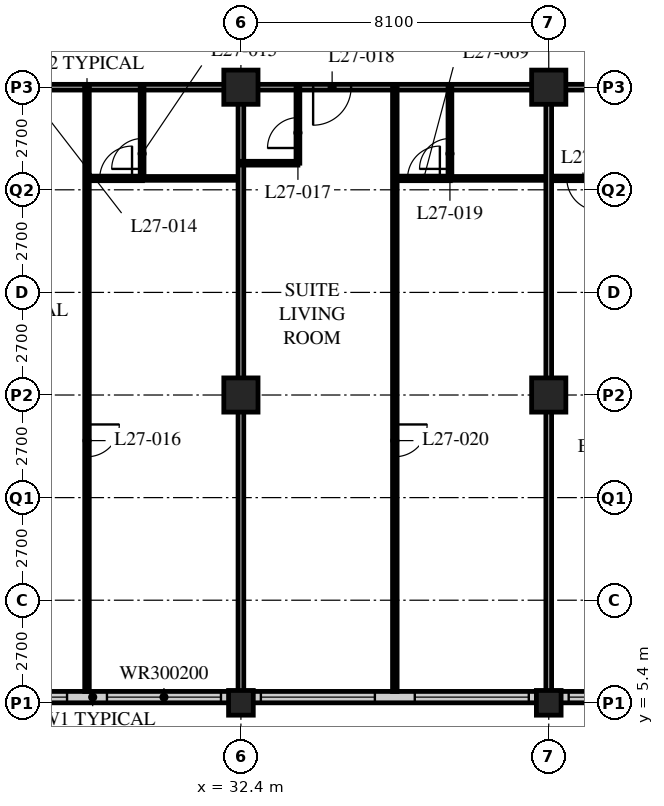
"""IFC4 building model, lengths in metres.
Left out: names, types, materials, properties, quantities, classifications, styles, units other than length and angle.
Written with IfcOpenShell. Run it as: python <this file> out.ifc"""

import sys

from ifc_helpers import new_model, si_unit, direction, frame, frame_2d, origin, origin_2d, place, context, subcontext, project, spatial, rectangle, hollow_rectangle, extrude, element, fill, save


model = new_model("IFC4")
c1 = context("Model", 3, precision=1e-05, world=origin(), true_north=direction((0.0, 1.0)))
c2 = subcontext(c1, "Body", "Model", "MODEL_VIEW")
j1 = project(units=[si_unit("LENGTHUNIT", "METRE"), si_unit("PLANEANGLEUNIT", "RADIAN")], contexts=[c1])
p1 = place(None, origin())
s1 = spatial("IfcSite", under=j1, at=p1, CompositionType="ELEMENT")
p2 = place(p1, origin())
s2 = spatial("IfcBuilding", under=s1, at=p2, CompositionType="ELEMENT")
p3 = place(p2, frame((0.0, 0.0, 110.2)))
s3 = spatial("IfcBuildingStorey", under=s2, at=p3, CompositionType="ELEMENT", Elevation=110.2)
p4 = place(p3, frame((32.4, 5.4, 0.0), z_axis=(0.0, 0.0, 1.0), x_axis=(1.0, 0.0, 0.0)))
e1 = element("IfcColumn", 1, at=p4, inside=s3, PredefinedType="COLUMN", context=c2, shape_type="SweptSolid", body=[
    extrude(hollow_rectangle(XDim=0.65, YDim=0.65, WallThickness=0.055, at=origin_2d()), origin(), (0.0, 0.0, 1.0), 3.4),
])
for number, where, z_axis, x_axis in (
    (2, (32.4, 13.5, 0.0), (0.0, 0.0, 1.0), (1.0, 0.0, 0.0)),
    (3, (32.4, 21.6, 0.0), (0.0, 0.0, 1.0), (1.0, 0.0, 0.0)),
):
    element("IfcColumn", number, at=place(p3, frame(where, z_axis=z_axis, x_axis=x_axis)), inside=s3, PredefinedType="COLUMN", context=c2, shape_type="SweptSolid", body=[
        extrude(hollow_rectangle(XDim=0.9, YDim=0.9, WallThickness=0.09, at=origin_2d()), origin(), (0.0, 0.0, 1.0), 3.4),
    ])
p5 = place(p3, frame((40.5, 5.4, 0.0), z_axis=(0.0, 0.0, 1.0), x_axis=(1.0, 0.0, 0.0)))
e4 = element("IfcColumn", 4, at=p5, inside=s3, PredefinedType="COLUMN", context=c2, shape_type="SweptSolid", body=[
    extrude(hollow_rectangle(XDim=0.65, YDim=0.65, WallThickness=0.055, at=origin_2d()), origin(), (0.0, 0.0, 1.0), 3.4),
])
for number, where, z_axis, x_axis in (
    (5, (40.5, 13.5, 0.0), (0.0, 0.0, 1.0), (1.0, 0.0, 0.0)),
    (6, (40.5, 21.6, 0.0), (0.0, 0.0, 1.0), (1.0, 0.0, 0.0)),
):
    element("IfcColumn", number, at=place(p3, frame(where, z_axis=z_axis, x_axis=x_axis)), inside=s3, PredefinedType="COLUMN", context=c2, shape_type="SweptSolid", body=[
        extrude(hollow_rectangle(XDim=0.9, YDim=0.9, WallThickness=0.09, at=origin_2d()), origin(), (0.0, 0.0, 1.0), 3.4),
    ])
p6 = place(p3, frame((8.4, 5.55, 0.0), z_axis=(0.0, 0.0, 1.0), x_axis=(1.0, 0.0, 0.0)))
e7 = element("IfcWall", 7, at=p6, inside=s3, PredefinedType="SOLIDWALL", context=c2, shape_type="SweptSolid", body=[
    extrude(rectangle(XDim=40.2, YDim=0.3, at=frame_2d((20.1, 0.0))), origin(), (0.0, 0.0, 1.0), 3.19),
])
p7 = place(p6, frame((0.225, 0.0, 0.9)))
e8 = element("IfcOpeningElement", 8, at=p7, cuts=e7, PredefinedType="OPENING", context=c2, shape_type="SweptSolid", body=[
    extrude(rectangle(XDim=3.0, YDim=2.0, at=frame_2d((1.5, 1.0))), frame((0.0, 0.16, 0.0), z_axis=(0.0, -1.0, 0.0), x_axis=(1.0, 0.0, 0.0)), (0.0, 0.0, 1.0), 0.32),
])
p8 = place(p6, frame((4.275, 0.0, 0.9)))
e9 = element("IfcOpeningElement", 9, at=p8, cuts=e7, PredefinedType="OPENING", context=c2, shape_type="SweptSolid", body=[
    extrude(rectangle(XDim=3.0, YDim=2.0, at=frame_2d((1.5, 1.0))), frame((0.0, 0.16, 0.0), z_axis=(0.0, -1.0, 0.0), x_axis=(1.0, 0.0, 0.0)), (0.0, 0.0, 1.0), 0.32),
])
p9 = place(p6, frame((8.325, 0.0, 0.9)))
e10 = element("IfcOpeningElement", 10, at=p9, cuts=e7, PredefinedType="OPENING", context=c2, shape_type="SweptSolid", body=[
    extrude(rectangle(XDim=3.0, YDim=2.0, at=frame_2d((1.5, 1.0))), frame((0.0, 0.16, 0.0), z_axis=(0.0, -1.0, 0.0), x_axis=(1.0, 0.0, 0.0)), (0.0, 0.0, 1.0), 0.32),
])
p10 = place(p6, frame((12.375, 0.0, 0.9)))
e11 = element("IfcOpeningElement", 11, at=p10, cuts=e7, PredefinedType="OPENING", context=c2, shape_type="SweptSolid", body=[
    extrude(rectangle(XDim=3.0, YDim=2.0, at=frame_2d((1.5, 1.0))), frame((0.0, 0.16, 0.0), z_axis=(0.0, -1.0, 0.0), x_axis=(1.0, 0.0, 0.0)), (0.0, 0.0, 1.0), 0.32),
])
p11 = place(p6, frame((16.425, 0.0, 0.9)))
e12 = element("IfcOpeningElement", 12, at=p11, cuts=e7, PredefinedType="OPENING", context=c2, shape_type="SweptSolid", body=[
    extrude(rectangle(XDim=3.0, YDim=2.0, at=frame_2d((1.5, 1.0))), frame((0.0, 0.16, 0.0), z_axis=(0.0, -1.0, 0.0), x_axis=(1.0, 0.0, 0.0)), (0.0, 0.0, 1.0), 0.32),
])
p12 = place(p6, frame((20.475, 0.0, 0.9)))
e13 = element("IfcOpeningElement", 13, at=p12, cuts=e7, PredefinedType="OPENING", context=c2, shape_type="SweptSolid", body=[
    extrude(rectangle(XDim=3.0, YDim=2.0, at=frame_2d((1.5, 1.0))), frame((0.0, 0.16, 0.0), z_axis=(0.0, -1.0, 0.0), x_axis=(1.0, 0.0, 0.0)), (0.0, 0.0, 1.0), 0.32),
])
p13 = place(p6, frame((24.525, 0.0, 0.9)))
e14 = element("IfcOpeningElement", 14, at=p13, cuts=e7, PredefinedType="OPENING", context=c2, shape_type="SweptSolid", body=[
    extrude(rectangle(XDim=3.0, YDim=2.0, at=frame_2d((1.5, 1.0))), frame((0.0, 0.16, 0.0), z_axis=(0.0, -1.0, 0.0), x_axis=(1.0, 0.0, 0.0)), (0.0, 0.0, 1.0), 0.32),
])
p14 = place(p6, frame((28.575, 0.0, 0.9)))
e15 = element("IfcOpeningElement", 15, at=p14, cuts=e7, PredefinedType="OPENING", context=c2, shape_type="SweptSolid", body=[
    extrude(rectangle(XDim=3.0, YDim=2.0, at=frame_2d((1.5, 1.0))), frame((0.0, 0.16, 0.0), z_axis=(0.0, -1.0, 0.0), x_axis=(1.0, 0.0, 0.0)), (0.0, 0.0, 1.0), 0.32),
])
p15 = place(p6, frame((32.625, 0.0, 0.9)))
e16 = element("IfcOpeningElement", 16, at=p15, cuts=e7, PredefinedType="OPENING", context=c2, shape_type="SweptSolid", body=[
    extrude(rectangle(XDim=3.0, YDim=2.0, at=frame_2d((1.5, 1.0))), frame((0.0, 0.16, 0.0), z_axis=(0.0, -1.0, 0.0), x_axis=(1.0, 0.0, 0.0)), (0.0, 0.0, 1.0), 0.32),
])
p16 = place(p6, frame((36.675, 0.0, 0.9)))
e17 = element("IfcOpeningElement", 17, at=p16, cuts=e7, PredefinedType="OPENING", context=c2, shape_type="SweptSolid", body=[
    extrude(rectangle(XDim=3.0, YDim=2.0, at=frame_2d((1.5, 1.0))), frame((0.0, 0.16, 0.0), z_axis=(0.0, -1.0, 0.0), x_axis=(1.0, 0.0, 0.0)), (0.0, 0.0, 1.0), 0.32),
])
p17 = place(p3, frame((12.15, 21.6, 0.0), z_axis=(0.0, 0.0, 1.0), x_axis=(1.0, 0.0, 0.0)))
e18 = element("IfcWall", 18, at=p17, inside=s3, PredefinedType="PARTITIONING", context=c2, shape_type="SweptSolid", body=[
    extrude(rectangle(XDim=32.4, YDim=0.15, at=frame_2d((16.2, 0.0))), origin(), (0.0, 0.0, 1.0), 2.578),
])
p18 = place(p17, frame((5.95, 0.0, 0.0)))
e19 = element("IfcOpeningElement", 19, at=p18, cuts=e18, PredefinedType="OPENING", context=c2, shape_type="SweptSolid", body=[
    extrude(rectangle(XDim=1.0, YDim=2.1, at=frame_2d((0.5, 1.05))), frame((0.0, 0.085, 0.0), z_axis=(0.0, -1.0, 0.0), x_axis=(1.0, 0.0, 0.0)), (0.0, 0.0, 1.0), 0.17),
])
p19 = place(p17, frame((14.05, 0.0, 0.0)))
e20 = element("IfcOpeningElement", 20, at=p19, cuts=e18, PredefinedType="OPENING", context=c2, shape_type="SweptSolid", body=[
    extrude(rectangle(XDim=1.0, YDim=2.1, at=frame_2d((0.5, 1.05))), frame((0.0, 0.085, 0.0), z_axis=(0.0, -1.0, 0.0), x_axis=(1.0, 0.0, 0.0)), (0.0, 0.0, 1.0), 0.17),
])
p20 = place(p17, frame((22.15, 0.0, 0.0)))
e21 = element("IfcOpeningElement", 21, at=p20, cuts=e18, PredefinedType="OPENING", context=c2, shape_type="SweptSolid", body=[
    extrude(rectangle(XDim=1.0, YDim=2.1, at=frame_2d((0.5, 1.05))), frame((0.0, 0.085, 0.0), z_axis=(0.0, -1.0, 0.0), x_axis=(1.0, 0.0, 0.0)), (0.0, 0.0, 1.0), 0.17),
])
p21 = place(p17, frame((1.525, 0.0, 0.0)))
e22 = element("IfcOpeningElement", 22, at=p21, cuts=e18, PredefinedType="OPENING", context=c2, shape_type="SweptSolid", body=[
    extrude(rectangle(XDim=1.0, YDim=2.1, at=frame_2d((0.5, 1.05))), frame((0.0, 0.085, 0.0), z_axis=(0.0, -1.0, 0.0), x_axis=(1.0, 0.0, 0.0)), (0.0, 0.0, 1.0), 0.17),
])
p22 = place(p17, frame((29.875, 0.0, 0.0)))
e23 = element("IfcOpeningElement", 23, at=p22, cuts=e18, PredefinedType="OPENING", context=c2, shape_type="SweptSolid", body=[
    extrude(rectangle(XDim=1.0, YDim=2.1, at=frame_2d((0.5, 1.05))), frame((0.0, 0.085, 0.0), z_axis=(0.0, -1.0, 0.0), x_axis=(1.0, 0.0, 0.0)), (0.0, 0.0, 1.0), 0.17),
])
p23 = place(p3, frame((29.8, 19.2, 0.0), z_axis=(0.0, 0.0, 1.0), x_axis=(1.0, 0.0, 0.0)))
e24 = element("IfcWall", 24, at=p23, inside=s3, PredefinedType="PARTITIONING", context=c2, shape_type="SweptSolid", body=[
    extrude(rectangle(XDim=2.6, YDim=0.1, at=frame_2d((1.3, 0.0))), origin(), (0.0, 0.0, 1.0), 3.19),
])
p24 = place(p3, frame((29.8, 21.6, 0.0), z_axis=(0.0, 0.0, 1.0), x_axis=(0.0, -1.0, 0.0)))
e25 = element("IfcWall", 25, at=p24, inside=s3, PredefinedType="PARTITIONING", context=c2, shape_type="SweptSolid", body=[
    extrude(rectangle(XDim=2.4, YDim=0.1, at=frame_2d((1.2, 0.0))), origin(), (0.0, 0.0, 1.0), 3.19),
])
p25 = place(p24, frame((1.35, 0.0, 0.0)))
e26 = element("IfcOpeningElement", 26, at=p25, cuts=e25, PredefinedType="OPENING", context=c2, shape_type="SweptSolid", body=[
    extrude(rectangle(XDim=0.8, YDim=2.1, at=frame_2d((0.4, 1.05))), frame((0.0, 0.06, 0.0), z_axis=(0.0, -1.0, 0.0), x_axis=(1.0, 0.0, 0.0)), (0.0, 0.0, 1.0), 0.12),
])
p26 = place(p3, frame((28.35, 21.6, 0.0), z_axis=(0.0, 0.0, 1.0), x_axis=(0.0, -1.0, 0.0)))
e27 = element("IfcWall", 27, at=p26, inside=s3, PredefinedType="PARTITIONING", context=c2, shape_type="SweptSolid", body=[
    extrude(rectangle(XDim=15.9, YDim=0.12, at=frame_2d((7.95, 0.0))), origin(), (0.0, 0.0, 1.0), 3.19),
])
p27 = place(p26, frame((8.875, 0.0, 0.0)))
e28 = element("IfcOpeningElement", 28, at=p27, cuts=e27, PredefinedType="OPENING", context=c2, shape_type="SweptSolid", body=[
    extrude(rectangle(XDim=0.85, YDim=2.1, at=frame_2d((0.425, 1.05))), frame((0.0, 0.07, 0.0), z_axis=(0.0, -1.0, 0.0), x_axis=(1.0, 0.0, 0.0)), (0.0, 0.0, 1.0), 0.14),
])
p28 = place(p3, frame((32.4, 21.6, 0.0), z_axis=(0.0, 0.0, 1.0), x_axis=(0.0, -1.0, 0.0)))
e29 = element("IfcWall", 29, at=p28, inside=s3, PredefinedType="PARTITIONING", context=c2, shape_type="SweptSolid", body=[
    extrude(rectangle(XDim=15.9, YDim=0.15, at=frame_2d((7.95, 0.0))), origin(), (0.0, 0.0, 1.0), 2.578),
])
p29 = place(p3, frame((32.4, 19.6, 0.0), z_axis=(0.0, 0.0, 1.0), x_axis=(1.0, 0.0, 0.0)))
e30 = element("IfcWall", 30, at=p29, inside=s3, PredefinedType="PARTITIONING", context=c2, shape_type="SweptSolid", body=[
    extrude(rectangle(XDim=1.5, YDim=0.1, at=frame_2d((0.75, 0.0))), origin(), (0.0, 0.0, 1.0), 3.19),
])
p30 = place(p3, frame((33.9, 21.6, 0.0), z_axis=(0.0, 0.0, 1.0), x_axis=(0.0, -1.0, 0.0)))
e31 = element("IfcWall", 31, at=p30, inside=s3, PredefinedType="PARTITIONING", context=c2, shape_type="SweptSolid", body=[
    extrude(rectangle(XDim=2.0, YDim=0.1, at=frame_2d((1.0, 0.0))), origin(), (0.0, 0.0, 1.0), 3.19),
])
p31 = place(p30, frame((0.8, 0.0, 0.0)))
e32 = element("IfcOpeningElement", 32, at=p31, cuts=e31, PredefinedType="OPENING", context=c2, shape_type="SweptSolid", body=[
    extrude(rectangle(XDim=0.8, YDim=2.1, at=frame_2d((0.4, 1.05))), frame((0.0, 0.06, 0.0), z_axis=(0.0, -1.0, 0.0), x_axis=(1.0, 0.0, 0.0)), (0.0, 0.0, 1.0), 0.12),
])
p32 = place(p3, frame((37.9, 19.2, 0.0), z_axis=(0.0, 0.0, 1.0), x_axis=(1.0, 0.0, 0.0)))
e33 = element("IfcWall", 33, at=p32, inside=s3, PredefinedType="PARTITIONING", context=c2, shape_type="SweptSolid", body=[
    extrude(rectangle(XDim=2.6, YDim=0.1, at=frame_2d((1.3, 0.0))), origin(), (0.0, 0.0, 1.0), 3.19),
])
p33 = place(p3, frame((37.9, 21.6, 0.0), z_axis=(0.0, 0.0, 1.0), x_axis=(0.0, -1.0, 0.0)))
e34 = element("IfcWall", 34, at=p33, inside=s3, PredefinedType="PARTITIONING", context=c2, shape_type="SweptSolid", body=[
    extrude(rectangle(XDim=2.4, YDim=0.1, at=frame_2d((1.2, 0.0))), origin(), (0.0, 0.0, 1.0), 3.19),
])
p34 = place(p33, frame((1.35, 0.0, 0.0)))
e35 = element("IfcOpeningElement", 35, at=p34, cuts=e34, PredefinedType="OPENING", context=c2, shape_type="SweptSolid", body=[
    extrude(rectangle(XDim=0.8, YDim=2.1, at=frame_2d((0.4, 1.05))), frame((0.0, 0.06, 0.0), z_axis=(0.0, -1.0, 0.0), x_axis=(1.0, 0.0, 0.0)), (0.0, 0.0, 1.0), 0.12),
])
p35 = place(p3, frame((36.45, 21.6, 0.0), z_axis=(0.0, 0.0, 1.0), x_axis=(0.0, -1.0, 0.0)))
e36 = element("IfcWall", 36, at=p35, inside=s3, PredefinedType="PARTITIONING", context=c2, shape_type="SweptSolid", body=[
    extrude(rectangle(XDim=15.9, YDim=0.12, at=frame_2d((7.95, 0.0))), origin(), (0.0, 0.0, 1.0), 3.19),
])
p36 = place(p35, frame((8.875, 0.0, 0.0)))
e37 = element("IfcOpeningElement", 37, at=p36, cuts=e36, PredefinedType="OPENING", context=c2, shape_type="SweptSolid", body=[
    extrude(rectangle(XDim=0.85, YDim=2.1, at=frame_2d((0.425, 1.05))), frame((0.0, 0.07, 0.0), z_axis=(0.0, -1.0, 0.0), x_axis=(1.0, 0.0, 0.0)), (0.0, 0.0, 1.0), 0.14),
])
p37 = place(p3, frame((40.5, 19.2, 0.0), z_axis=(0.0, 0.0, 1.0), x_axis=(1.0, 0.0, 0.0)))
e38 = element("IfcWall", 38, at=p37, inside=s3, PredefinedType="PARTITIONING", context=c2, shape_type="SweptSolid", body=[
    extrude(rectangle(XDim=8.05, YDim=0.12, at=frame_2d((4.025, 0.0))), origin(), (0.0, 0.0, 1.0), 3.19),
])
p38 = place(p37, frame((0.475, 0.0, 0.0)))
e39 = element("IfcOpeningElement", 39, at=p38, cuts=e38, PredefinedType="OPENING", context=c2, shape_type="SweptSolid", body=[
    extrude(rectangle(XDim=0.85, YDim=2.1, at=frame_2d((0.425, 1.05))), frame((0.0, 0.07, 0.0), z_axis=(0.0, -1.0, 0.0), x_axis=(1.0, 0.0, 0.0)), (0.0, 0.0, 1.0), 0.14),
])
p39 = place(p37, frame((4.325, 0.0, 0.0)))
e40 = element("IfcOpeningElement", 40, at=p39, cuts=e38, PredefinedType="OPENING", context=c2, shape_type="SweptSolid", body=[
    extrude(rectangle(XDim=0.85, YDim=2.1, at=frame_2d((0.425, 1.05))), frame((0.0, 0.07, 0.0), z_axis=(0.0, -1.0, 0.0), x_axis=(1.0, 0.0, 0.0)), (0.0, 0.0, 1.0), 0.14),
])
p40 = place(p3, frame((40.5, 21.6, 0.0), z_axis=(0.0, 0.0, 1.0), x_axis=(0.0, -1.0, 0.0)))
e41 = element("IfcWall", 41, at=p40, inside=s3, PredefinedType="PARTITIONING", context=c2, shape_type="SweptSolid", body=[
    extrude(rectangle(XDim=15.9, YDim=0.15, at=frame_2d((7.95, 0.0))), origin(), (0.0, 0.0, 1.0), 2.578),
])
p41 = place(p3, frame((29.81, 19.2, 0.0), z_axis=(0.0, 0.0, 1.0), x_axis=(-1.0, 0.0, 0.0)))
e42 = element("IfcWall", 42, at=p41, inside=s3, PredefinedType="PARTITIONING", context=c2, shape_type="SweptSolid", body=[
    extrude(rectangle(XDim=1.46, YDim=0.12, at=frame_2d((0.73, 0.0))), origin(), (0.0, 0.0, 1.0), 3.19),
])
p42 = place(p41, frame((0.275, 0.0, 0.0)))
e43 = element("IfcOpeningElement", 43, at=p42, cuts=e42, PredefinedType="OPENING", context=c2, shape_type="SweptSolid", body=[
    extrude(rectangle(XDim=0.85, YDim=2.1, at=frame_2d((0.425, 1.05))), frame((0.0, 0.07, 0.0), z_axis=(0.0, -1.0, 0.0), x_axis=(1.0, 0.0, 0.0)), (0.0, 0.0, 1.0), 0.14),
])
p43 = place(p3, frame((37.91, 19.2, 0.0), z_axis=(0.0, 0.0, 1.0), x_axis=(-1.0, 0.0, 0.0)))
e44 = element("IfcWall", 44, at=p43, inside=s3, PredefinedType="PARTITIONING", context=c2, shape_type="SweptSolid", body=[
    extrude(rectangle(XDim=1.46, YDim=0.12, at=frame_2d((0.73, 0.0))), origin(), (0.0, 0.0, 1.0), 3.19),
])
p44 = place(p43, frame((0.275, 0.0, 0.0)))
e45 = element("IfcOpeningElement", 45, at=p44, cuts=e44, PredefinedType="OPENING", context=c2, shape_type="SweptSolid", body=[
    extrude(rectangle(XDim=0.85, YDim=2.1, at=frame_2d((0.425, 1.05))), frame((0.0, 0.07, 0.0), z_axis=(0.0, -1.0, 0.0), x_axis=(1.0, 0.0, 0.0)), (0.0, 0.0, 1.0), 0.14),
])
p45 = place(p11, origin())
e46 = element("IfcWindow", 46, at=p45, inside=s3, PartitioningType="SINGLE_PANEL", PredefinedType="WINDOW", context=c2, shape_type="SweptSolid", body=[
    extrude(rectangle(XDim=3.0, YDim=2.0, at=frame_2d((1.5, 1.0))), frame((0.0, 0.03, 0.0), z_axis=(0.0, -1.0, 0.0), x_axis=(1.0, 0.0, 0.0)), (0.0, 0.0, 1.0), 0.06),
])
fill(e12, e46)
p46 = place(p12, origin())
e47 = element("IfcWindow", 47, at=p46, inside=s3, PartitioningType="SINGLE_PANEL", PredefinedType="WINDOW", context=c2, shape_type="SweptSolid", body=[
    extrude(rectangle(XDim=3.0, YDim=2.0, at=frame_2d((1.5, 1.0))), frame((0.0, 0.03, 0.0), z_axis=(0.0, -1.0, 0.0), x_axis=(1.0, 0.0, 0.0)), (0.0, 0.0, 1.0), 0.06),
])
fill(e13, e47)
p47 = place(p13, origin())
e48 = element("IfcWindow", 48, at=p47, inside=s3, PartitioningType="SINGLE_PANEL", PredefinedType="WINDOW", context=c2, shape_type="SweptSolid", body=[
    extrude(rectangle(XDim=3.0, YDim=2.0, at=frame_2d((1.5, 1.0))), frame((0.0, 0.03, 0.0), z_axis=(0.0, -1.0, 0.0), x_axis=(1.0, 0.0, 0.0)), (0.0, 0.0, 1.0), 0.06),
])
fill(e14, e48)
p48 = place(p14, origin())
e49 = element("IfcWindow", 49, at=p48, inside=s3, PartitioningType="SINGLE_PANEL", PredefinedType="WINDOW", context=c2, shape_type="SweptSolid", body=[
    extrude(rectangle(XDim=3.0, YDim=2.0, at=frame_2d((1.5, 1.0))), frame((0.0, 0.03, 0.0), z_axis=(0.0, -1.0, 0.0), x_axis=(1.0, 0.0, 0.0)), (0.0, 0.0, 1.0), 0.06),
])
fill(e15, e49)
p49 = place(p15, origin())
e50 = element("IfcWindow", 50, at=p49, inside=s3, PartitioningType="SINGLE_PANEL", PredefinedType="WINDOW", context=c2, shape_type="SweptSolid", body=[
    extrude(rectangle(XDim=3.0, YDim=2.0, at=frame_2d((1.5, 1.0))), frame((0.0, 0.03, 0.0), z_axis=(0.0, -1.0, 0.0), x_axis=(1.0, 0.0, 0.0)), (0.0, 0.0, 1.0), 0.06),
])
fill(e16, e50)
p50 = place(p25, origin())
e51 = element("IfcDoor", 51, at=p50, inside=s3, OperationType="SINGLE_SWING_LEFT", PredefinedType="DOOR", context=c2, shape_type="SweptSolid", body=[
    extrude(rectangle(XDim=0.8, YDim=2.1, at=frame_2d((0.4, 1.05))), frame((0.0, 0.025, 0.0), z_axis=(0.0, -1.0, 0.0), x_axis=(1.0, 0.0, 0.0)), (0.0, 0.0, 1.0), 0.05),
])
fill(e26, e51)
p51 = place(p27, origin())
e52 = element("IfcDoor", 52, at=p51, inside=s3, OperationType="SINGLE_SWING_LEFT", PredefinedType="DOOR", context=c2, shape_type="SweptSolid", body=[
    extrude(rectangle(XDim=0.85, YDim=2.1, at=frame_2d((0.425, 1.05))), frame((0.0, 0.025, 0.0), z_axis=(0.0, -1.0, 0.0), x_axis=(1.0, 0.0, 0.0)), (0.0, 0.0, 1.0), 0.05),
])
fill(e28, e52)
p52 = place(p31, origin())
e53 = element("IfcDoor", 53, at=p52, inside=s3, OperationType="SINGLE_SWING_LEFT", PredefinedType="DOOR", context=c2, shape_type="SweptSolid", body=[
    extrude(rectangle(XDim=0.8, YDim=2.1, at=frame_2d((0.4, 1.05))), frame((0.0, 0.025, 0.0), z_axis=(0.0, -1.0, 0.0), x_axis=(1.0, 0.0, 0.0)), (0.0, 0.0, 1.0), 0.05),
])
fill(e32, e53)
p53 = place(p20, origin())
e54 = element("IfcDoor", 54, at=p53, inside=s3, OperationType="SINGLE_SWING_RIGHT", PredefinedType="DOOR", context=c2, shape_type="SweptSolid", body=[
    extrude(rectangle(XDim=1.0, YDim=2.1, at=frame_2d((0.5, 1.05))), frame((0.0, 0.025, 0.0), z_axis=(0.0, -1.0, 0.0), x_axis=(1.0, 0.0, 0.0)), (0.0, 0.0, 1.0), 0.05),
])
fill(e21, e54)
p54 = place(p34, origin())
e55 = element("IfcDoor", 55, at=p54, inside=s3, OperationType="SINGLE_SWING_LEFT", PredefinedType="DOOR", context=c2, shape_type="SweptSolid", body=[
    extrude(rectangle(XDim=0.8, YDim=2.1, at=frame_2d((0.4, 1.05))), frame((0.0, 0.025, 0.0), z_axis=(0.0, -1.0, 0.0), x_axis=(1.0, 0.0, 0.0)), (0.0, 0.0, 1.0), 0.05),
])
fill(e35, e55)
p55 = place(p36, origin())
e56 = element("IfcDoor", 56, at=p55, inside=s3, OperationType="SINGLE_SWING_LEFT", PredefinedType="DOOR", context=c2, shape_type="SweptSolid", body=[
    extrude(rectangle(XDim=0.85, YDim=2.1, at=frame_2d((0.425, 1.05))), frame((0.0, 0.025, 0.0), z_axis=(0.0, -1.0, 0.0), x_axis=(1.0, 0.0, 0.0)), (0.0, 0.0, 1.0), 0.05),
])
fill(e37, e56)
p56 = place(p38, origin())
e57 = element("IfcDoor", 57, at=p56, inside=s3, OperationType="SINGLE_SWING_LEFT", PredefinedType="DOOR", context=c2, shape_type="SweptSolid", body=[
    extrude(rectangle(XDim=0.85, YDim=2.1, at=frame_2d((0.425, 1.05))), frame((0.0, 0.025, 0.0), z_axis=(0.0, -1.0, 0.0), x_axis=(1.0, 0.0, 0.0)), (0.0, 0.0, 1.0), 0.05),
])
fill(e39, e57)
p57 = place(p42, origin())
e58 = element("IfcDoor", 58, at=p57, inside=s3, OperationType="SINGLE_SWING_RIGHT", PredefinedType="DOOR", context=c2, shape_type="SweptSolid", body=[
    extrude(rectangle(XDim=0.85, YDim=2.1, at=frame_2d((0.425, 1.05))), frame((0.0, 0.025, 0.0), z_axis=(0.0, -1.0, 0.0), x_axis=(1.0, 0.0, 0.0)), (0.0, 0.0, 1.0), 0.05),
])
fill(e43, e58)
p58 = place(p44, origin())
e59 = element("IfcDoor", 59, at=p58, inside=s3, OperationType="SINGLE_SWING_RIGHT", PredefinedType="DOOR", context=c2, shape_type="SweptSolid", body=[
    extrude(rectangle(XDim=0.85, YDim=2.1, at=frame_2d((0.425, 1.05))), frame((0.0, 0.025, 0.0), z_axis=(0.0, -1.0, 0.0), x_axis=(1.0, 0.0, 0.0)), (0.0, 0.0, 1.0), 0.05),
])
fill(e45, e59)
save(model, sys.argv[1])
